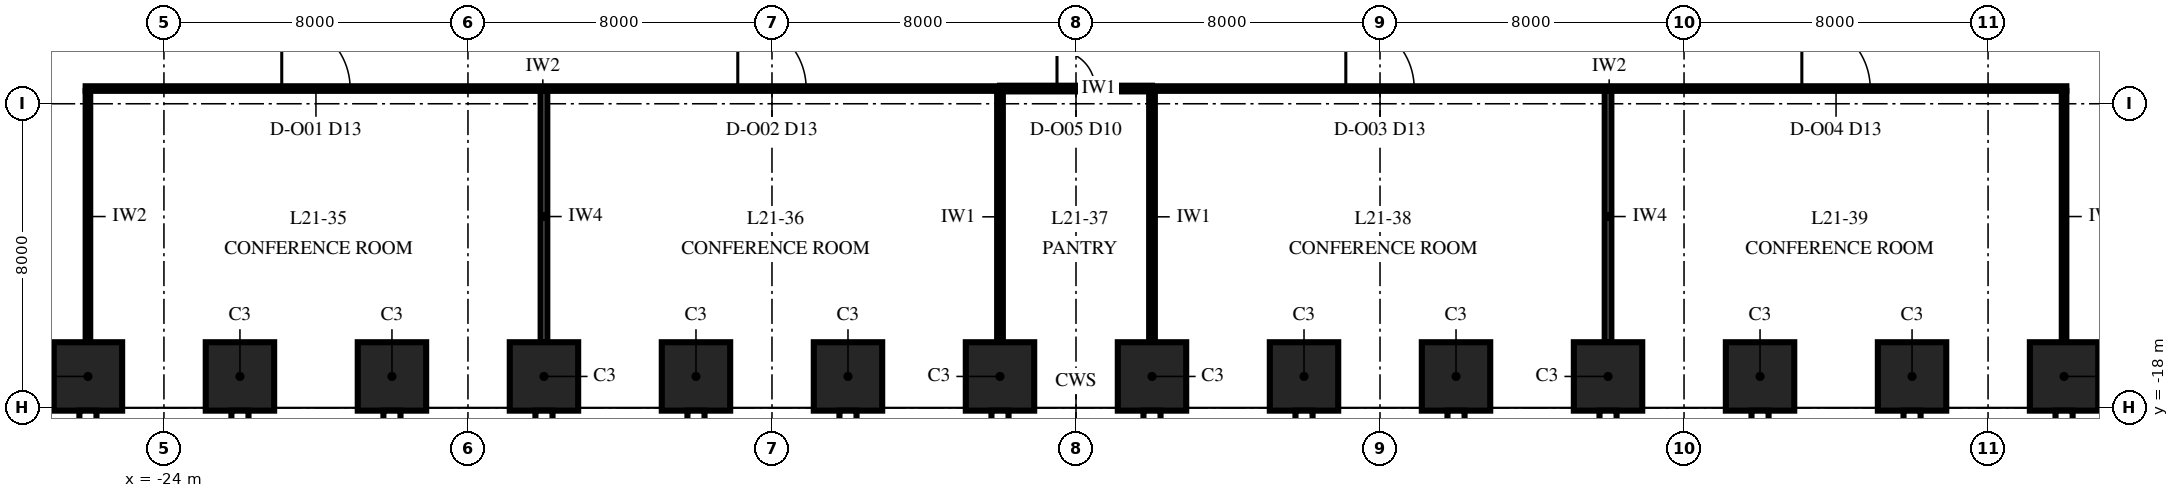
"""IFC4 building model, lengths in metres.
Left out: names, types, materials, properties, quantities, classifications, styles, units other than length and angle.
Written with IfcOpenShell. Run it as: python <this file> out.ifc"""

import sys

from ifc_helpers import new_model, si_unit, direction, frame, frame_2d, origin, origin_2d, place, context, subcontext, project, spatial, rectangle, extrude, element, fill, save


model = new_model("IFC4")
c1 = context("Model", 3, precision=1e-05, world=origin(), true_north=direction((0.0, 1.0)))
c2 = subcontext(c1, "Body", "Model", "MODEL_VIEW")
j1 = project(units=[si_unit("LENGTHUNIT", "METRE"), si_unit("PLANEANGLEUNIT", "RADIAN")], contexts=[c1])
p1 = place(None, origin())
s1 = spatial("IfcSite", under=j1, at=p1, CompositionType="ELEMENT")
p2 = place(p1, origin())
s2 = spatial("IfcBuilding", under=s1, at=p2, CompositionType="ELEMENT")
p3 = place(p2, frame((0.0, 0.0, 98.0)))
s3 = spatial("IfcBuildingStorey", under=s2, at=p3, CompositionType="ELEMENT", Elevation=98.0)
for number, where, z_axis, x_axis in (
    (1, (-26.0, -17.175, 0.0), (0.0, 0.0, 1.0), (1.0, 0.0, 0.0)),
    (2, (-22.0, -17.175, 0.0), (0.0, 0.0, 1.0), (1.0, 0.0, 0.0)),
    (3, (-18.0, -17.175, 0.0), (0.0, 0.0, 1.0), (1.0, 0.0, 0.0)),
    (4, (-14.0, -17.175, 0.0), (0.0, 0.0, 1.0), (1.0, 0.0, 0.0)),
    (5, (-10.0, -17.175, 0.0), (0.0, 0.0, 1.0), (1.0, 0.0, 0.0)),
    (6, (-6.0, -17.175, 0.0), (0.0, 0.0, 1.0), (1.0, 0.0, 0.0)),
    (7, (-2.0, -17.175, 0.0), (0.0, 0.0, 1.0), (1.0, 0.0, 0.0)),
    (8, (2.0, -17.175, 0.0), (0.0, 0.0, 1.0), (1.0, 0.0, 0.0)),
    (9, (6.0, -17.175, 0.0), (0.0, 0.0, 1.0), (1.0, 0.0, 0.0)),
    (10, (10.0, -17.175, 0.0), (0.0, 0.0, 1.0), (1.0, 0.0, 0.0)),
    (11, (14.0, -17.175, 0.0), (0.0, 0.0, 1.0), (1.0, 0.0, 0.0)),
    (12, (18.0, -17.175, 0.0), (0.0, 0.0, 1.0), (1.0, 0.0, 0.0)),
    (13, (22.0, -17.175, 0.0), (0.0, 0.0, 1.0), (1.0, 0.0, 0.0)),
    (14, (26.0, -17.175, 0.0), (0.0, 0.0, 1.0), (1.0, 0.0, 0.0)),
):
    element("IfcColumn", number, at=place(p3, frame(where, z_axis=z_axis, x_axis=x_axis)), inside=s3, PredefinedType="COLUMN", context=c2, shape_type="SweptSolid", body=[
        extrude(rectangle(XDim=1.8, YDim=1.8, at=origin_2d()), origin(), (0.0, 0.0, 1.0), 5.0),
    ])
p4 = place(p3, frame((-26.06, -9.6, 0.0), z_axis=(0.0, 0.0, 1.0), x_axis=(1.0, 0.0, 0.0)))
e15 = element("IfcWall", 15, at=p4, inside=s3, PredefinedType="PARTITIONING", context=c2, shape_type="SweptSolid", body=[
    extrude(rectangle(XDim=24.06, YDim=0.12, at=frame_2d((12.03, 0.0))), origin(), (0.0, 0.0, 1.0), 4.25),
])
p5 = place(p4, frame((5.16, 0.0, 0.0)))
e16 = element("IfcOpeningElement", 16, at=p5, cuts=e15, PredefinedType="OPENING", context=c2, shape_type="SweptSolid", body=[
    extrude(rectangle(XDim=1.8, YDim=2.4, at=frame_2d((0.9, 1.2))), frame((0.0, 0.075, 0.0), z_axis=(0.0, -1.0, 0.0), x_axis=(1.0, 0.0, 0.0)), (0.0, 0.0, 1.0), 0.15),
])
p6 = place(p4, frame((17.16, 0.0, 0.0)))
e17 = element("IfcOpeningElement", 17, at=p6, cuts=e15, PredefinedType="OPENING", context=c2, shape_type="SweptSolid", body=[
    extrude(rectangle(XDim=1.8, YDim=2.4, at=frame_2d((0.9, 1.2))), frame((0.0, 0.075, 0.0), z_axis=(0.0, -1.0, 0.0), x_axis=(1.0, 0.0, 0.0)), (0.0, 0.0, 1.0), 0.15),
])
p7 = place(p3, frame((-2.0, -9.6, 0.0), z_axis=(0.0, 0.0, 1.0), x_axis=(1.0, 0.0, 0.0)))
e18 = element("IfcWall", 18, at=p7, inside=s3, PredefinedType="PARTITIONING", context=c2, shape_type="SweptSolid", body=[
    extrude(rectangle(XDim=4.0, YDim=0.15, at=frame_2d((2.0, 0.0))), origin(), (0.0, 0.0, 1.0), 4.25),
])
p8 = place(p7, frame((1.5, 0.0, 0.0)))
e19 = element("IfcOpeningElement", 19, at=p8, cuts=e18, PredefinedType="OPENING", context=c2, shape_type="SweptSolid", body=[
    extrude(rectangle(XDim=1.0, YDim=2.3, at=frame_2d((0.5, 1.15))), frame((0.0, 0.09, 0.0), z_axis=(0.0, -1.0, 0.0), x_axis=(1.0, 0.0, 0.0)), (0.0, 0.0, 1.0), 0.18),
])
p9 = place(p3, frame((2.0, -9.6, 0.0), z_axis=(0.0, 0.0, 1.0), x_axis=(1.0, 0.0, 0.0)))
e20 = element("IfcWall", 20, at=p9, inside=s3, PredefinedType="PARTITIONING", context=c2, shape_type="SweptSolid", body=[
    extrude(rectangle(XDim=24.06, YDim=0.12, at=frame_2d((12.03, 0.0))), origin(), (0.0, 0.0, 1.0), 4.25),
])
p10 = place(p9, frame((5.1, 0.0, 0.0)))
e21 = element("IfcOpeningElement", 21, at=p10, cuts=e20, PredefinedType="OPENING", context=c2, shape_type="SweptSolid", body=[
    extrude(rectangle(XDim=1.8, YDim=2.4, at=frame_2d((0.9, 1.2))), frame((0.0, 0.075, 0.0), z_axis=(0.0, -1.0, 0.0), x_axis=(1.0, 0.0, 0.0)), (0.0, 0.0, 1.0), 0.15),
])
p11 = place(p9, frame((17.1, 0.0, 0.0)))
e22 = element("IfcOpeningElement", 22, at=p11, cuts=e20, PredefinedType="OPENING", context=c2, shape_type="SweptSolid", body=[
    extrude(rectangle(XDim=1.8, YDim=2.4, at=frame_2d((0.9, 1.2))), frame((0.0, 0.075, 0.0), z_axis=(0.0, -1.0, 0.0), x_axis=(1.0, 0.0, 0.0)), (0.0, 0.0, 1.0), 0.15),
])
p12 = place(p3, frame((-26.0, -16.275, 0.0), z_axis=(0.0, 0.0, 1.0), x_axis=(0.0, 1.0, 0.0)))
e23 = element("IfcWall", 23, at=p12, inside=s3, PredefinedType="PARTITIONING", context=c2, shape_type="SweptSolid", body=[
    extrude(rectangle(XDim=6.615, YDim=0.12, at=frame_2d((3.308, 0.0))), origin(), (0.0, 0.0, 1.0), 4.25),
])
p13 = place(p3, frame((-14.0, -16.275, 0.0), z_axis=(0.0, 0.0, 1.0), x_axis=(0.0, 1.0, 0.0)))
e24 = element("IfcWall", 24, at=p13, inside=s3, PredefinedType="PARTITIONING", context=c2, shape_type="SweptSolid", body=[
    extrude(rectangle(XDim=6.615, YDim=0.175, at=frame_2d((3.308, 0.0))), origin(), (0.0, 0.0, 1.0), 4.25),
])
for number, where, z_axis, x_axis in (
    (25, (-2.0, -16.275, 0.0), (0.0, 0.0, 1.0), (0.0, 1.0, 0.0)),
    (26, (2.0, -16.275, 0.0), (0.0, 0.0, 1.0), (0.0, 1.0, 0.0)),
):
    element("IfcWall", number, at=place(p3, frame(where, z_axis=z_axis, x_axis=x_axis)), inside=s3, PredefinedType="PARTITIONING", context=c2, shape_type="SweptSolid", body=[
        extrude(rectangle(XDim=6.6, YDim=0.15, at=frame_2d((3.3, 0.0))), origin(), (0.0, 0.0, 1.0), 4.25),
    ])
p14 = place(p3, frame((14.0, -16.275, 0.0), z_axis=(0.0, 0.0, 1.0), x_axis=(0.0, 1.0, 0.0)))
e27 = element("IfcWall", 27, at=p14, inside=s3, PredefinedType="PARTITIONING", context=c2, shape_type="SweptSolid", body=[
    extrude(rectangle(XDim=6.615, YDim=0.175, at=frame_2d((3.308, 0.0))), origin(), (0.0, 0.0, 1.0), 4.25),
])
p15 = place(p3, frame((26.0, -16.275, 0.0), z_axis=(0.0, 0.0, 1.0), x_axis=(0.0, 1.0, 0.0)))
e28 = element("IfcWall", 28, at=p15, inside=s3, PredefinedType="PARTITIONING", context=c2, shape_type="SweptSolid", body=[
    extrude(rectangle(XDim=6.615, YDim=0.12, at=frame_2d((3.308, 0.0))), origin(), (0.0, 0.0, 1.0), 4.25),
])
p16 = place(p5, origin())
e29 = element("IfcDoor", 29, at=p16, inside=s3, OperationType="DOUBLE_DOOR_SINGLE_SWING", PredefinedType="DOOR", context=c2, shape_type="SweptSolid", body=[
    extrude(rectangle(XDim=1.8, YDim=2.4, at=frame_2d((0.9, 1.2))), frame((0.0, 0.06, 0.0), z_axis=(0.0, -1.0, 0.0), x_axis=(1.0, 0.0, 0.0)), (0.0, 0.0, 1.0), 0.12),
])
fill(e16, e29)
p17 = place(p6, origin())
e30 = element("IfcDoor", 30, at=p17, inside=s3, OperationType="DOUBLE_DOOR_SINGLE_SWING", PredefinedType="DOOR", context=c2, shape_type="SweptSolid", body=[
    extrude(rectangle(XDim=1.8, YDim=2.4, at=frame_2d((0.9, 1.2))), frame((0.0, 0.06, 0.0), z_axis=(0.0, -1.0, 0.0), x_axis=(1.0, 0.0, 0.0)), (0.0, 0.0, 1.0), 0.12),
])
fill(e17, e30)
p18 = place(p10, origin())
e31 = element("IfcDoor", 31, at=p18, inside=s3, OperationType="DOUBLE_DOOR_SINGLE_SWING", PredefinedType="DOOR", context=c2, shape_type="SweptSolid", body=[
    extrude(rectangle(XDim=1.8, YDim=2.4, at=frame_2d((0.9, 1.2))), frame((0.0, 0.06, 0.0), z_axis=(0.0, -1.0, 0.0), x_axis=(1.0, 0.0, 0.0)), (0.0, 0.0, 1.0), 0.12),
])
fill(e21, e31)
p19 = place(p11, origin())
e32 = element("IfcDoor", 32, at=p19, inside=s3, OperationType="DOUBLE_DOOR_SINGLE_SWING", PredefinedType="DOOR", context=c2, shape_type="SweptSolid", body=[
    extrude(rectangle(XDim=1.8, YDim=2.4, at=frame_2d((0.9, 1.2))), frame((0.0, 0.06, 0.0), z_axis=(0.0, -1.0, 0.0), x_axis=(1.0, 0.0, 0.0)), (0.0, 0.0, 1.0), 0.12),
])
fill(e22, e32)
p20 = place(p8, origin())
e33 = element("IfcDoor", 33, at=p20, inside=s3, OperationType="SINGLE_SWING_LEFT", PredefinedType="DOOR", context=c2, shape_type="SweptSolid", body=[
    extrude(rectangle(XDim=1.0, YDim=2.3, at=frame_2d((0.5, 1.15))), frame((0.0, 0.075, 0.0), z_axis=(0.0, -1.0, 0.0), x_axis=(1.0, 0.0, 0.0)), (0.0, 0.0, 1.0), 0.149),
])
fill(e19, e33)
save(model, sys.argv[1])
